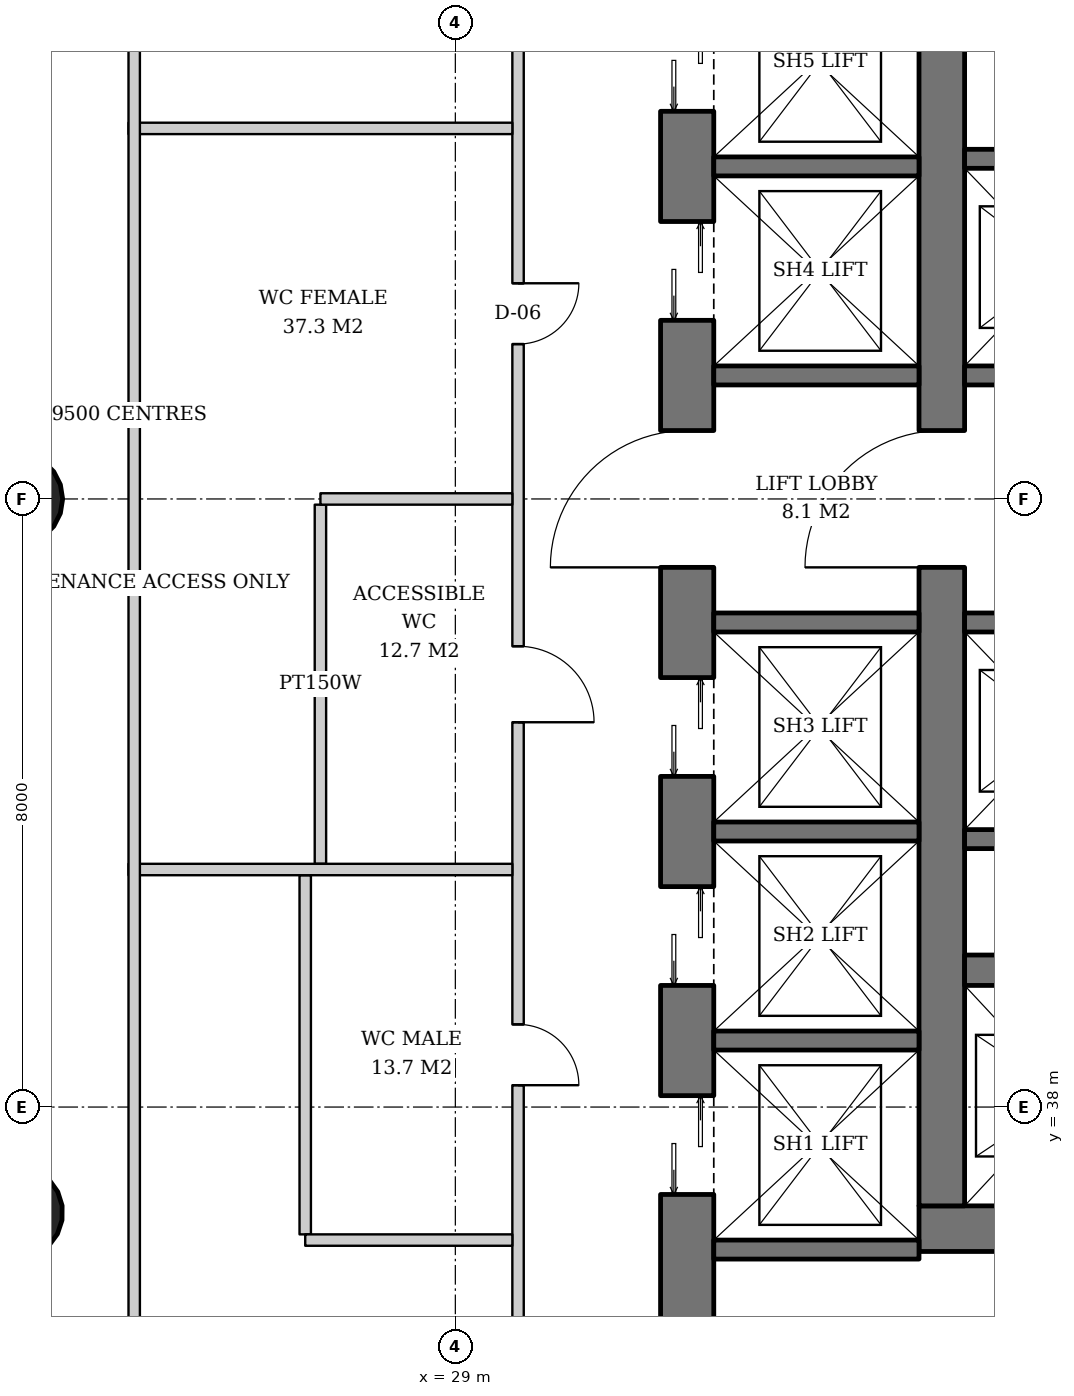
"""IFC4 building model, lengths in metres.
Left out: names, types, materials, properties, quantities, classifications, styles, units other than length and angle.
Written with IfcOpenShell. Run it as: python <this file> out.ifc"""

import sys

from ifc_helpers import new_model, si_unit, direction, frame, frame_2d, origin, origin_2d, place, context, subcontext, project, spatial, rectangle, hollow_circle, extrude, element, fill, save


model = new_model("IFC4")
c1 = context("Model", 3, precision=1e-05, world=origin(), true_north=direction((0.0, 1.0)))
c2 = subcontext(c1, "Body", "Model", "MODEL_VIEW")
j1 = project(units=[si_unit("LENGTHUNIT", "METRE"), si_unit("PLANEANGLEUNIT", "RADIAN")], contexts=[c1])
p1 = place(None, origin())
s1 = spatial("IfcSite", under=j1, at=p1, CompositionType="ELEMENT")
p2 = place(p1, origin())
s2 = spatial("IfcBuilding", under=s1, at=p2, CompositionType="ELEMENT")
p3 = place(p2, frame((0.0, 0.0, 89.4)))
s3 = spatial("IfcBuildingStorey", under=s2, at=p3, CompositionType="ELEMENT", Elevation=89.4)
p4 = place(p3, frame((23.186, 46.0, 0.0), z_axis=(0.031914348339, 0.0, 0.999490607445), x_axis=(0.0, 1.0, 0.0)))
e1 = element("IfcColumn", 1, at=p4, inside=s3, PredefinedType="COLUMN", context=c2, shape_type="SweptSolid", body=[
    extrude(hollow_circle(Radius=0.61, WallThickness=0.04, at=origin_2d()), origin(), (0.0, 0.0, 1.0), 3.802),
])
p5 = place(p3, frame((23.186, 36.593, 0.0), z_axis=(0.031910269556, 0.015987237665, 0.999362868496), x_axis=(-0.447933021895, 0.894067115991, 0.0)))
e2 = element("IfcColumn", 2, at=p5, inside=s3, PredefinedType="COLUMN", context=c2, shape_type="SweptSolid", body=[
    extrude(hollow_circle(Radius=0.61, WallThickness=0.04, at=origin_2d()), origin(), (0.0, 0.0, 1.0), 3.802),
])
p6 = place(p3, frame((35.1, 36.4, 0.0), z_axis=(0.0, 0.0, 1.0), x_axis=(1.0, 0.0, 0.0)))
e3 = element("IfcWall", 3, at=p6, inside=s3, PredefinedType="SHEAR", context=c2, shape_type="SweptSolid", body=[
    extrude(rectangle(XDim=19.8, YDim=0.6, at=frame_2d((9.9, 0.0))), origin(), (0.0, 0.0, 1.0), 3.8),
])
p7 = place(p6, frame((3.9, 0.0, 0.0)))
e4 = element("IfcOpeningElement", 4, at=p7, cuts=e3, PredefinedType="OPENING", context=c2, shape_type="SweptSolid", body=[
    extrude(rectangle(XDim=1.0, YDim=2.1, at=frame_2d((0.5, 1.05))), frame((0.0, 0.31, 0.0), z_axis=(0.0, -1.0, 0.0), x_axis=(1.0, 0.0, 0.0)), (0.0, 0.0, 1.0), 0.62),
])
p8 = place(p6, frame((15.35, 0.0, 0.0)))
e5 = element("IfcOpeningElement", 5, at=p8, cuts=e3, PredefinedType="OPENING", context=c2, shape_type="SweptSolid", body=[
    extrude(rectangle(XDim=1.0, YDim=2.1, at=frame_2d((0.5, 1.05))), frame((0.0, 0.31, 0.0), z_axis=(0.0, -1.0, 0.0), x_axis=(1.0, 0.0, 0.0)), (0.0, 0.0, 1.0), 0.62),
])
p9 = place(p3, frame((35.4, 36.7, 0.0), z_axis=(0.0, 0.0, 1.0), x_axis=(0.0, 1.0, 0.0)))
e6 = element("IfcWall", 6, at=p9, inside=s3, PredefinedType="SHEAR", context=c2, shape_type="SweptSolid", body=[
    extrude(rectangle(XDim=18.6, YDim=0.6, at=frame_2d((9.3, 0.0))), origin(), (0.0, 0.0, 1.0), 3.8),
])
p10 = place(p9, frame((8.4, 0.0, 0.0)))
e7 = element("IfcOpeningElement", 7, at=p10, cuts=e6, PredefinedType="OPENING", context=c2, shape_type="SweptSolid", body=[
    extrude(rectangle(XDim=1.8, YDim=2.4, at=frame_2d((0.9, 1.2))), frame((0.0, 0.31, 0.0), z_axis=(0.0, -1.0, 0.0), x_axis=(1.0, 0.0, 0.0)), (0.0, 0.0, 1.0), 0.62),
])
p11 = place(p3, frame((32.05, 33.4, 0.0), z_axis=(0.0, 0.0, 1.0), x_axis=(0.0, 1.0, 0.0)))
e8 = element("IfcWall", 8, at=p11, inside=s3, PredefinedType="SHEAR", context=c2, shape_type="SweptSolid", body=[
    extrude(rectangle(XDim=25.2, YDim=0.7, at=frame_2d((12.6, 0.0))), origin(), (0.0, 0.0, 1.0), 3.8),
])
p12 = place(p11, frame((3.45, 0.0, 0.0)))
e9 = element("IfcOpeningElement", 9, at=p12, cuts=e8, PredefinedType="OPENING", context=c2, shape_type="SweptSolid", body=[
    extrude(rectangle(XDim=1.3, YDim=2.2, at=frame_2d((0.65, 1.1))), frame((0.0, 0.36, 0.0), z_axis=(0.0, -1.0, 0.0), x_axis=(1.0, 0.0, 0.0)), (0.0, 0.0, 1.0), 0.72),
])
p13 = place(p11, frame((6.2, 0.0, 0.0)))
e10 = element("IfcOpeningElement", 10, at=p13, cuts=e8, PredefinedType="OPENING", context=c2, shape_type="SweptSolid", body=[
    extrude(rectangle(XDim=1.3, YDim=2.2, at=frame_2d((0.65, 1.1))), frame((0.0, 0.36, 0.0), z_axis=(0.0, -1.0, 0.0), x_axis=(1.0, 0.0, 0.0)), (0.0, 0.0, 1.0), 0.72),
])
p14 = place(p11, frame((8.95, 0.0, 0.0)))
e11 = element("IfcOpeningElement", 11, at=p14, cuts=e8, PredefinedType="OPENING", context=c2, shape_type="SweptSolid", body=[
    extrude(rectangle(XDim=1.3, YDim=2.2, at=frame_2d((0.65, 1.1))), frame((0.0, 0.36, 0.0), z_axis=(0.0, -1.0, 0.0), x_axis=(1.0, 0.0, 0.0)), (0.0, 0.0, 1.0), 0.72),
])
p15 = place(p11, frame((14.95, 0.0, 0.0)))
e12 = element("IfcOpeningElement", 12, at=p15, cuts=e8, PredefinedType="OPENING", context=c2, shape_type="SweptSolid", body=[
    extrude(rectangle(XDim=1.3, YDim=2.2, at=frame_2d((0.65, 1.1))), frame((0.0, 0.36, 0.0), z_axis=(0.0, -1.0, 0.0), x_axis=(1.0, 0.0, 0.0)), (0.0, 0.0, 1.0), 0.72),
])
p16 = place(p11, frame((17.7, 0.0, 0.0)))
e13 = element("IfcOpeningElement", 13, at=p16, cuts=e8, PredefinedType="OPENING", context=c2, shape_type="SweptSolid", body=[
    extrude(rectangle(XDim=1.3, YDim=2.2, at=frame_2d((0.65, 1.1))), frame((0.0, 0.36, 0.0), z_axis=(0.0, -1.0, 0.0), x_axis=(1.0, 0.0, 0.0)), (0.0, 0.0, 1.0), 0.72),
])
p17 = place(p11, frame((11.7, 0.0, 0.0)))
e14 = element("IfcOpeningElement", 14, at=p17, cuts=e8, PredefinedType="OPENING", context=c2, shape_type="SweptSolid", body=[
    extrude(rectangle(XDim=1.8, YDim=2.4, at=frame_2d((0.9, 1.2))), frame((0.0, 0.36, 0.0), z_axis=(0.0, -1.0, 0.0), x_axis=(1.0, 0.0, 0.0)), (0.0, 0.0, 1.0), 0.72),
])
p18 = place(p3, frame((35.7, 39.8, 0.0), z_axis=(0.0, 0.0, 1.0), x_axis=(1.0, 0.0, 0.0)))
e15 = element("IfcWall", 15, at=p18, inside=s3, PredefinedType="SHEAR", context=c2, shape_type="SweptSolid", body=[
    extrude(rectangle(XDim=18.6, YDim=0.4, at=frame_2d((9.3, 0.0))), origin(), (0.0, 0.0, 1.0), 3.8),
])
p19 = place(p3, frame((35.7, 50.475, 0.0), z_axis=(0.0, 0.0, 1.0), x_axis=(1.0, 0.0, 0.0)))
e16 = element("IfcWall", 16, at=p19, inside=s3, PredefinedType="SHEAR", context=c2, shape_type="SweptSolid", body=[
    extrude(rectangle(XDim=11.0, YDim=0.25, at=frame_2d((5.5, 0.0))), origin(), (0.0, 0.0, 1.0), 3.8),
])
p20 = place(p3, frame((35.7, 47.625, 0.0), z_axis=(0.0, 0.0, 1.0), x_axis=(1.0, 0.0, 0.0)))
e17 = element("IfcWall", 17, at=p20, inside=s3, PredefinedType="SHEAR", context=c2, shape_type="SweptSolid", body=[
    extrude(rectangle(XDim=12.83, YDim=0.25, at=frame_2d((6.415, 0.0))), origin(), (0.0, 0.0, 1.0), 3.8),
])
p21 = place(p20, frame((0.7, 0.0, 0.0)))
e18 = element("IfcOpeningElement", 18, at=p21, cuts=e17, PredefinedType="OPENING", context=c2, shape_type="SweptSolid", body=[
    extrude(rectangle(XDim=1.1, YDim=2.2, at=frame_2d((0.55, 1.1))), frame((0.0, 0.135, 0.0), z_axis=(0.0, -1.0, 0.0), x_axis=(1.0, 0.0, 0.0)), (0.0, 0.0, 1.0), 0.27),
])
p22 = place(p20, frame((3.45, 0.0, 0.0)))
e19 = element("IfcOpeningElement", 19, at=p22, cuts=e17, PredefinedType="OPENING", context=c2, shape_type="SweptSolid", body=[
    extrude(rectangle(XDim=1.1, YDim=2.2, at=frame_2d((0.55, 1.1))), frame((0.0, 0.135, 0.0), z_axis=(0.0, -1.0, 0.0), x_axis=(1.0, 0.0, 0.0)), (0.0, 0.0, 1.0), 0.27),
])
p23 = place(p20, frame((6.2, 0.0, 0.0)))
e20 = element("IfcOpeningElement", 20, at=p23, cuts=e17, PredefinedType="OPENING", context=c2, shape_type="SweptSolid", body=[
    extrude(rectangle(XDim=1.1, YDim=2.2, at=frame_2d((0.55, 1.1))), frame((0.0, 0.135, 0.0), z_axis=(0.0, -1.0, 0.0), x_axis=(1.0, 0.0, 0.0)), (0.0, 0.0, 1.0), 0.27),
])
p24 = place(p20, frame((8.95, 0.0, 0.0)))
e21 = element("IfcOpeningElement", 21, at=p24, cuts=e17, PredefinedType="OPENING", context=c2, shape_type="SweptSolid", body=[
    extrude(rectangle(XDim=1.1, YDim=2.2, at=frame_2d((0.55, 1.1))), frame((0.0, 0.135, 0.0), z_axis=(0.0, -1.0, 0.0), x_axis=(1.0, 0.0, 0.0)), (0.0, 0.0, 1.0), 0.27),
])
p25 = place(p20, frame((11.515, 0.0, 0.0)))
e22 = element("IfcOpeningElement", 22, at=p25, cuts=e17, PredefinedType="OPENING", context=c2, shape_type="SweptSolid", body=[
    extrude(rectangle(XDim=0.8, YDim=2.0, at=frame_2d((0.4, 1.0))), frame((0.0, 0.135, 0.0), z_axis=(0.0, -1.0, 0.0), x_axis=(1.0, 0.0, 0.0)), (0.0, 0.0, 1.0), 0.27),
])
p26 = place(p3, frame((35.7, 41.525, 0.0), z_axis=(0.0, 0.0, 1.0), x_axis=(1.0, 0.0, 0.0)))
e23 = element("IfcWall", 23, at=p26, inside=s3, PredefinedType="SHEAR", context=c2, shape_type="SweptSolid", body=[
    extrude(rectangle(XDim=11.0, YDim=0.25, at=frame_2d((5.5, 0.0))), origin(), (0.0, 0.0, 1.0), 3.8),
])
p27 = place(p3, frame((35.7, 44.375, 0.0), z_axis=(0.0, 0.0, 1.0), x_axis=(1.0, 0.0, 0.0)))
e24 = element("IfcWall", 24, at=p27, inside=s3, PredefinedType="SHEAR", context=c2, shape_type="SweptSolid", body=[
    extrude(rectangle(XDim=12.83, YDim=0.25, at=frame_2d((6.415, 0.0))), origin(), (0.0, 0.0, 1.0), 3.8),
])
p28 = place(p27, frame((0.7, 0.0, 0.0)))
e25 = element("IfcOpeningElement", 25, at=p28, cuts=e24, PredefinedType="OPENING", context=c2, shape_type="SweptSolid", body=[
    extrude(rectangle(XDim=1.1, YDim=2.2, at=frame_2d((0.55, 1.1))), frame((0.0, 0.135, 0.0), z_axis=(0.0, -1.0, 0.0), x_axis=(1.0, 0.0, 0.0)), (0.0, 0.0, 1.0), 0.27),
])
p29 = place(p27, frame((3.45, 0.0, 0.0)))
e26 = element("IfcOpeningElement", 26, at=p29, cuts=e24, PredefinedType="OPENING", context=c2, shape_type="SweptSolid", body=[
    extrude(rectangle(XDim=1.1, YDim=2.2, at=frame_2d((0.55, 1.1))), frame((0.0, 0.135, 0.0), z_axis=(0.0, -1.0, 0.0), x_axis=(1.0, 0.0, 0.0)), (0.0, 0.0, 1.0), 0.27),
])
p30 = place(p27, frame((6.2, 0.0, 0.0)))
e27 = element("IfcOpeningElement", 27, at=p30, cuts=e24, PredefinedType="OPENING", context=c2, shape_type="SweptSolid", body=[
    extrude(rectangle(XDim=1.1, YDim=2.2, at=frame_2d((0.55, 1.1))), frame((0.0, 0.135, 0.0), z_axis=(0.0, -1.0, 0.0), x_axis=(1.0, 0.0, 0.0)), (0.0, 0.0, 1.0), 0.27),
])
p31 = place(p27, frame((8.95, 0.0, 0.0)))
e28 = element("IfcOpeningElement", 28, at=p31, cuts=e24, PredefinedType="OPENING", context=c2, shape_type="SweptSolid", body=[
    extrude(rectangle(XDim=1.1, YDim=2.2, at=frame_2d((0.55, 1.1))), frame((0.0, 0.135, 0.0), z_axis=(0.0, -1.0, 0.0), x_axis=(1.0, 0.0, 0.0)), (0.0, 0.0, 1.0), 0.27),
])
p32 = place(p27, frame((11.515, 0.0, 0.0)))
e29 = element("IfcOpeningElement", 29, at=p32, cuts=e24, PredefinedType="OPENING", context=c2, shape_type="SweptSolid", body=[
    extrude(rectangle(XDim=0.8, YDim=2.0, at=frame_2d((0.4, 1.0))), frame((0.0, 0.135, 0.0), z_axis=(0.0, -1.0, 0.0), x_axis=(1.0, 0.0, 0.0)), (0.0, 0.0, 1.0), 0.27),
])
for number, where, z_axis, x_axis in (
    (30, (32.4, 36.125, 0.0), (0.0, 0.0, 1.0), (1.0, 0.0, 0.0)),
    (31, (32.4, 38.875, 0.0), (0.0, 0.0, 1.0), (1.0, 0.0, 0.0)),
    (32, (32.4, 41.625, 0.0), (0.0, 0.0, 1.0), (1.0, 0.0, 0.0)),
    (33, (32.4, 44.375, 0.0), (0.0, 0.0, 1.0), (1.0, 0.0, 0.0)),
    (34, (32.4, 47.625, 0.0), (0.0, 0.0, 1.0), (1.0, 0.0, 0.0)),
    (35, (32.4, 50.375, 0.0), (0.0, 0.0, 1.0), (1.0, 0.0, 0.0)),
):
    element("IfcWall", number, at=place(p3, frame(where, z_axis=z_axis, x_axis=x_axis)), inside=s3, PredefinedType="SHEAR", context=c2, shape_type="SweptSolid", body=[
        extrude(rectangle(XDim=2.7, YDim=0.25, at=frame_2d((1.35, 0.0))), origin(), (0.0, 0.0, 1.0), 3.8),
    ])
p33 = place(p3, frame((27.225, 45.925, 0.0), z_axis=(0.0, 0.0, 1.0), x_axis=(0.0, -1.0, 0.0)))
e36 = element("IfcWall", 36, at=p33, inside=s3, PredefinedType="PARTITIONING", context=c2, shape_type="SweptSolid", body=[
    extrude(rectangle(XDim=4.725, YDim=0.15, at=frame_2d((2.363, 0.0))), origin(), (0.0, 0.0, 1.0), 2.858),
])
p34 = place(p3, frame((27.025, 41.05, 0.0), z_axis=(0.0, 0.0, 1.0), x_axis=(0.0, -1.0, 0.0)))
e37 = element("IfcWall", 37, at=p34, inside=s3, PredefinedType="PARTITIONING", context=c2, shape_type="SweptSolid", body=[
    extrude(rectangle(XDim=4.725, YDim=0.15, at=frame_2d((2.363, 0.0))), origin(), (0.0, 0.0, 1.0), 2.612),
])
p35 = place(p3, frame((29.825, 61.25, 0.0), z_axis=(0.0, 0.0, 1.0), x_axis=(0.0, -1.0, 0.0)))
e38 = element("IfcWall", 38, at=p35, inside=s3, PredefinedType="PARTITIONING", context=c2, shape_type="SweptSolid", body=[
    extrude(rectangle(XDim=30.35, YDim=0.15, at=frame_2d((15.175, 0.0))), origin(), (0.0, 0.0, 1.0), 2.612),
])
p36 = place(p35, frame((7.038, 0.0, 0.0)))
e39 = element("IfcOpeningElement", 39, at=p36, cuts=e38, PredefinedType="OPENING", context=c2, shape_type="SweptSolid", body=[
    extrude(rectangle(XDim=1.8, YDim=2.4, at=frame_2d((0.9, 1.2))), frame((0.0, 0.085, 0.0), z_axis=(0.0, -1.0, 0.0), x_axis=(1.0, 0.0, 0.0)), (0.0, 0.0, 1.0), 0.17),
])
p37 = place(p35, frame((12.413, 0.0, 0.0)))
e40 = element("IfcOpeningElement", 40, at=p37, cuts=e38, PredefinedType="OPENING", context=c2, shape_type="SweptSolid", body=[
    extrude(rectangle(XDim=0.8, YDim=2.1, at=frame_2d((0.4, 1.05))), frame((0.0, 0.085, 0.0), z_axis=(0.0, -1.0, 0.0), x_axis=(1.0, 0.0, 0.0)), (0.0, 0.0, 1.0), 0.17),
])
p38 = place(p35, frame((17.188, 0.0, 0.0)))
e41 = element("IfcOpeningElement", 41, at=p38, cuts=e38, PredefinedType="OPENING", context=c2, shape_type="SweptSolid", body=[
    extrude(rectangle(XDim=1.0, YDim=2.1, at=frame_2d((0.5, 1.05))), frame((0.0, 0.085, 0.0), z_axis=(0.0, -1.0, 0.0), x_axis=(1.0, 0.0, 0.0)), (0.0, 0.0, 1.0), 0.17),
])
p39 = place(p35, frame((22.163, 0.0, 0.0)))
e42 = element("IfcOpeningElement", 42, at=p39, cuts=e38, PredefinedType="OPENING", context=c2, shape_type="SweptSolid", body=[
    extrude(rectangle(XDim=0.8, YDim=2.1, at=frame_2d((0.4, 1.05))), frame((0.0, 0.085, 0.0), z_axis=(0.0, -1.0, 0.0), x_axis=(1.0, 0.0, 0.0)), (0.0, 0.0, 1.0), 0.17),
])
p40 = place(p3, frame((29.75, 50.875, 0.0), z_axis=(0.0, 0.0, 1.0), x_axis=(-1.0, 0.0, 0.0)))
e43 = element("IfcWall", 43, at=p40, inside=s3, PredefinedType="PARTITIONING", context=c2, shape_type="SweptSolid", body=[
    extrude(rectangle(XDim=5.05, YDim=0.15, at=frame_2d((2.525, 0.0))), origin(), (0.0, 0.0, 1.0), 3.62),
])
p41 = place(p3, frame((29.75, 46.0, 0.0), z_axis=(0.0, 0.0, 1.0), x_axis=(-1.0, 0.0, 0.0)))
e44 = element("IfcWall", 44, at=p41, inside=s3, PredefinedType="PARTITIONING", context=c2, shape_type="SweptSolid", body=[
    extrude(rectangle(XDim=2.525, YDim=0.15, at=frame_2d((1.262, 0.0))), origin(), (0.0, 0.0, 1.0), 2.858),
])
p42 = place(p3, frame((29.75, 41.125, 0.0), z_axis=(0.0, 0.0, 1.0), x_axis=(-1.0, 0.0, 0.0)))
e45 = element("IfcWall", 45, at=p42, inside=s3, PredefinedType="PARTITIONING", context=c2, shape_type="SweptSolid", body=[
    extrude(rectangle(XDim=5.05, YDim=0.15, at=frame_2d((2.525, 0.0))), origin(), (0.0, 0.0, 1.0), 3.62),
])
p43 = place(p3, frame((29.75, 36.25, 0.0), z_axis=(0.0, 0.0, 1.0), x_axis=(-1.0, 0.0, 0.0)))
e46 = element("IfcWall", 46, at=p43, inside=s3, PredefinedType="PARTITIONING", context=c2, shape_type="SweptSolid", body=[
    extrude(rectangle(XDim=2.725, YDim=0.15, at=frame_2d((1.363, 0.0))), origin(), (0.0, 0.0, 1.0), 3.62),
])
p44 = place(p3, frame((24.775, 28.7, 0.0), z_axis=(0.0, 0.0, 1.0), x_axis=(0.0, 1.0, 0.0)))
e47 = element("IfcWall", 47, at=p44, inside=s3, PredefinedType="PARTITIONING", context=c2, shape_type="SweptSolid", body=[
    extrude(rectangle(XDim=34.6, YDim=0.15, at=frame_2d((17.3, 0.0))), origin(), (0.0, 0.0, 1.0), 2.612),
])
p45 = place(p10, origin())
e48 = element("IfcDoor", 48, at=p45, inside=s3, OperationType="DOUBLE_DOOR_SINGLE_SWING", PredefinedType="DOOR", context=c2, shape_type="SweptSolid", body=[
    extrude(rectangle(XDim=1.8, YDim=2.4, at=frame_2d((0.9, 1.2))), frame((0.0, 0.025, 0.0), z_axis=(0.0, -1.0, 0.0), x_axis=(1.0, 0.0, 0.0)), (0.0, 0.0, 1.0), 0.05),
])
fill(e7, e48)
p46 = place(p12, origin())
e49 = element("IfcDoor", 49, at=p46, inside=s3, OperationType="DOUBLE_DOOR_SLIDING", PredefinedType="DOOR", context=c2, shape_type="SweptSolid", body=[
    extrude(rectangle(XDim=1.3, YDim=2.2, at=frame_2d((0.65, 1.1))), frame((0.0, 0.025, 0.0), z_axis=(0.0, -1.0, 0.0), x_axis=(1.0, 0.0, 0.0)), (0.0, 0.0, 1.0), 0.05),
])
fill(e9, e49)
p47 = place(p13, origin())
e50 = element("IfcDoor", 50, at=p47, inside=s3, OperationType="DOUBLE_DOOR_SLIDING", PredefinedType="DOOR", context=c2, shape_type="SweptSolid", body=[
    extrude(rectangle(XDim=1.3, YDim=2.2, at=frame_2d((0.65, 1.1))), frame((0.0, 0.025, 0.0), z_axis=(0.0, -1.0, 0.0), x_axis=(1.0, 0.0, 0.0)), (0.0, 0.0, 1.0), 0.05),
])
fill(e10, e50)
p48 = place(p14, origin())
e51 = element("IfcDoor", 51, at=p48, inside=s3, OperationType="DOUBLE_DOOR_SLIDING", PredefinedType="DOOR", context=c2, shape_type="SweptSolid", body=[
    extrude(rectangle(XDim=1.3, YDim=2.2, at=frame_2d((0.65, 1.1))), frame((0.0, 0.025, 0.0), z_axis=(0.0, -1.0, 0.0), x_axis=(1.0, 0.0, 0.0)), (0.0, 0.0, 1.0), 0.05),
])
fill(e11, e51)
p49 = place(p15, origin())
e52 = element("IfcDoor", 52, at=p49, inside=s3, OperationType="DOUBLE_DOOR_SLIDING", PredefinedType="DOOR", context=c2, shape_type="SweptSolid", body=[
    extrude(rectangle(XDim=1.3, YDim=2.2, at=frame_2d((0.65, 1.1))), frame((0.0, 0.025, 0.0), z_axis=(0.0, -1.0, 0.0), x_axis=(1.0, 0.0, 0.0)), (0.0, 0.0, 1.0), 0.05),
])
fill(e12, e52)
p50 = place(p16, origin())
e53 = element("IfcDoor", 53, at=p50, inside=s3, OperationType="DOUBLE_DOOR_SLIDING", PredefinedType="DOOR", context=c2, shape_type="SweptSolid", body=[
    extrude(rectangle(XDim=1.3, YDim=2.2, at=frame_2d((0.65, 1.1))), frame((0.0, 0.025, 0.0), z_axis=(0.0, -1.0, 0.0), x_axis=(1.0, 0.0, 0.0)), (0.0, 0.0, 1.0), 0.05),
])
fill(e13, e53)
p51 = place(p17, origin())
e54 = element("IfcDoor", 54, at=p51, inside=s3, OperationType="DOUBLE_DOOR_SINGLE_SWING", PredefinedType="DOOR", context=c2, shape_type="SweptSolid", body=[
    extrude(rectangle(XDim=1.8, YDim=2.4, at=frame_2d((0.9, 1.2))), frame((0.0, 0.025, 0.0), z_axis=(0.0, -1.0, 0.0), x_axis=(1.0, 0.0, 0.0)), (0.0, 0.0, 1.0), 0.05),
])
fill(e14, e54)
p52 = place(p37, origin())
e55 = element("IfcDoor", 55, at=p52, inside=s3, OperationType="SINGLE_SWING_LEFT", PredefinedType="DOOR", context=c2, shape_type="SweptSolid", body=[
    extrude(rectangle(XDim=0.8, YDim=2.1, at=frame_2d((0.4, 1.05))), frame((0.0, 0.025, 0.0), z_axis=(0.0, -1.0, 0.0), x_axis=(1.0, 0.0, 0.0)), (0.0, 0.0, 1.0), 0.05),
])
fill(e40, e55)
p53 = place(p38, origin())
e56 = element("IfcDoor", 56, at=p53, inside=s3, OperationType="SINGLE_SWING_RIGHT", PredefinedType="DOOR", context=c2, shape_type="SweptSolid", body=[
    extrude(rectangle(XDim=1.0, YDim=2.1, at=frame_2d((0.5, 1.05))), frame((0.0, 0.025, 0.0), z_axis=(0.0, -1.0, 0.0), x_axis=(1.0, 0.0, 0.0)), (0.0, 0.0, 1.0), 0.05),
])
fill(e41, e56)
p54 = place(p39, origin())
e57 = element("IfcDoor", 57, at=p54, inside=s3, OperationType="SINGLE_SWING_RIGHT", PredefinedType="DOOR", context=c2, shape_type="SweptSolid", body=[
    extrude(rectangle(XDim=0.8, YDim=2.1, at=frame_2d((0.4, 1.05))), frame((0.0, 0.025, 0.0), z_axis=(0.0, -1.0, 0.0), x_axis=(1.0, 0.0, 0.0)), (0.0, 0.0, 1.0), 0.05),
])
fill(e42, e57)
save(model, sys.argv[1])
